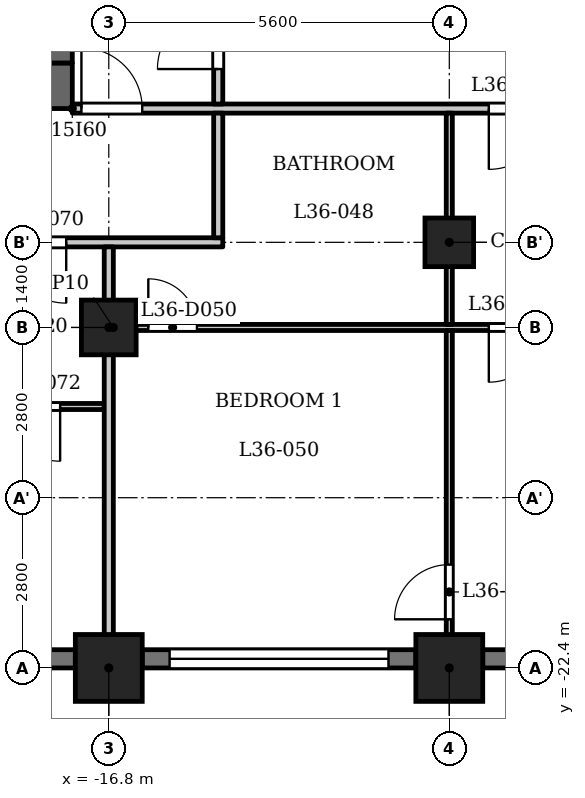
"""IFC4 building model, lengths in metres.
Left out: names, types, materials, properties, quantities, classifications, styles, units other than length and angle.
Written with IfcOpenShell. Run it as: python <this file> out.ifc"""

import sys

from ifc_helpers import new_model, si_unit, direction, frame, frame_2d, origin, origin_2d, place, context, subcontext, project, spatial, rectangle, extrude, element, fill, save


model = new_model("IFC4")
c1 = context("Model", 3, precision=1e-05, world=origin(), true_north=direction((0.0, 1.0)))
c2 = subcontext(c1, "Body", "Model", "MODEL_VIEW")
j1 = project(units=[si_unit("LENGTHUNIT", "METRE"), si_unit("PLANEANGLEUNIT", "RADIAN")], contexts=[c1])
p1 = place(None, origin())
s1 = spatial("IfcSite", under=j1, at=p1, CompositionType="ELEMENT")
p2 = place(p1, origin())
s2 = spatial("IfcBuilding", under=s1, at=p2, CompositionType="ELEMENT")
p3 = place(p2, frame((0.0, 0.0, 143.1)))
s3 = spatial("IfcBuildingStorey", under=s2, at=p3, CompositionType="ELEMENT", Elevation=143.1)
for number, where, z_axis, x_axis in (
    (1, (-16.8, -22.4, 0.0), (0.0, 0.0, 1.0), (1.0, 0.0, 0.0)),
    (2, (-11.2, -22.4, 0.0), (0.0, 0.0, 1.0), (1.0, 0.0, 0.0)),
):
    element("IfcColumn", number, at=place(p3, frame(where, z_axis=z_axis, x_axis=x_axis)), inside=s3, PredefinedType="COLUMN", context=c2, shape_type="SweptSolid", body=[
        extrude(rectangle(XDim=1.1, YDim=1.1, at=origin_2d()), origin(), (0.0, 0.0, 1.0), 3.5),
    ])
p4 = place(p3, frame((-16.8, -16.8, 0.0), z_axis=(0.0, 0.0, 1.0), x_axis=(1.0, 0.0, 0.0)))
e3 = element("IfcColumn", 3, at=p4, inside=s3, PredefinedType="COLUMN", context=c2, shape_type="SweptSolid", body=[
    extrude(rectangle(XDim=0.9, YDim=0.9, at=origin_2d()), origin(), (0.0, 0.0, 1.0), 3.5),
])
p5 = place(p3, frame((-11.2, -15.4, 0.0), z_axis=(0.0, 0.0, 1.0), x_axis=(1.0, 0.0, 0.0)))
e4 = element("IfcColumn", 4, at=p5, inside=s3, PredefinedType="COLUMN", context=c2, shape_type="SweptSolid", body=[
    extrude(rectangle(XDim=0.8, YDim=0.8, at=origin_2d()), origin(), (0.0, 0.0, 1.0), 3.5),
])
p6 = place(p3, frame((-20.0, -22.25, 0.0), z_axis=(0.0, 0.0, 1.0), x_axis=(1.0, 0.0, 0.0)))
e5 = element("IfcWall", 5, at=p6, inside=s3, PredefinedType="SOLIDWALL", context=c2, shape_type="SweptSolid", body=[
    extrude(rectangle(XDim=2.65, YDim=0.3, at=frame_2d((1.325, 0.0))), origin(), (0.0, 0.0, 1.0), 2.45),
])
p7 = place(p6, frame((0.425, 0.0, 0.9)))
e6 = element("IfcOpeningElement", 6, at=p7, cuts=e5, PredefinedType="OPENING", context=c2, shape_type="SweptSolid", body=[
    extrude(rectangle(XDim=1.8, YDim=1.25, at=frame_2d((0.9, 0.625))), frame((0.0, 0.16, 0.0), z_axis=(0.0, -1.0, 0.0), x_axis=(1.0, 0.0, 0.0)), (0.0, 0.0, 1.0), 0.32),
])
p8 = place(p3, frame((-16.25, -22.25, 0.0), z_axis=(0.0, 0.0, 1.0), x_axis=(1.0, 0.0, 0.0)))
e7 = element("IfcWall", 7, at=p8, inside=s3, PredefinedType="SOLIDWALL", context=c2, shape_type="SweptSolid", body=[
    extrude(rectangle(XDim=4.5, YDim=0.3, at=frame_2d((2.25, 0.0))), origin(), (0.0, 0.0, 1.0), 2.45),
])
p9 = place(p8, frame((0.45, 0.0, 1.2)))
e8 = element("IfcOpeningElement", 8, at=p9, cuts=e7, PredefinedType="OPENING", context=c2, shape_type="SweptSolid", body=[
    extrude(rectangle(XDim=3.6, YDim=0.95, at=frame_2d((1.8, 0.475))), frame((0.0, 0.16, 0.0), z_axis=(0.0, -1.0, 0.0), x_axis=(1.0, 0.0, 0.0)), (0.0, 0.0, 1.0), 0.32),
])
p10 = place(p3, frame((-10.65, -22.25, 0.0), z_axis=(0.0, 0.0, 1.0), x_axis=(1.0, 0.0, 0.0)))
e9 = element("IfcWall", 9, at=p10, inside=s3, PredefinedType="SOLIDWALL", context=c2, shape_type="SweptSolid", body=[
    extrude(rectangle(XDim=4.5, YDim=0.3, at=frame_2d((2.25, 0.0))), origin(), (0.0, 0.0, 1.0), 2.45),
])
p11 = place(p10, frame((0.45, 0.0, 1.2)))
e10 = element("IfcOpeningElement", 10, at=p11, cuts=e9, PredefinedType="OPENING", context=c2, shape_type="SweptSolid", body=[
    extrude(rectangle(XDim=3.6, YDim=0.95, at=frame_2d((1.8, 0.475))), frame((0.0, 0.16, 0.0), z_axis=(0.0, -1.0, 0.0), x_axis=(1.0, 0.0, 0.0)), (0.0, 0.0, 1.0), 0.32),
])
p12 = place(p3, frame((-17.4, -12.825, 0.0), z_axis=(0.0, 0.0, 1.0), x_axis=(-1.0, 0.0, 0.0)))
e11 = element("IfcWall", 11, at=p12, inside=s3, PredefinedType="SHEAR", context=c2, shape_type="SweptSolid", body=[
    extrude(rectangle(XDim=10.4, YDim=0.75, at=frame_2d((5.2, 0.0))), origin(), (0.0, 0.0, 1.0), 3.2),
])
p13 = place(p3, frame((-17.6, -12.45, 0.0), z_axis=(0.0, 0.0, 1.0), x_axis=(0.0, 1.0, 0.0)))
e12 = element("IfcWall", 12, at=p13, inside=s3, PredefinedType="SHEAR", context=c2, shape_type="SweptSolid", body=[
    extrude(rectangle(XDim=24.9, YDim=0.4, at=frame_2d((12.45, 0.0))), origin(), (0.0, 0.0, 1.0), 3.2),
])
p14 = place(p13, frame((8.65, 0.0, 0.0)))
e13 = element("IfcOpeningElement", 13, at=p14, cuts=e12, PredefinedType="OPENING", context=c2, shape_type="SweptSolid", body=[
    extrude(rectangle(XDim=0.9, YDim=2.1, at=frame_2d((0.45, 1.05))), frame((0.0, 0.21, 0.0), z_axis=(0.0, -1.0, 0.0), x_axis=(1.0, 0.0, 0.0)), (0.0, 0.0, 1.0), 0.42),
])
p15 = place(p13, frame((15.6, 0.0, 0.0)))
e14 = element("IfcOpeningElement", 14, at=p15, cuts=e12, PredefinedType="OPENING", context=c2, shape_type="SweptSolid", body=[
    extrude(rectangle(XDim=1.1, YDim=2.1, at=frame_2d((0.55, 1.05))), frame((0.0, 0.21, 0.0), z_axis=(0.0, -1.0, 0.0), x_axis=(1.0, 0.0, 0.0)), (0.0, 0.0, 1.0), 0.42),
])
p16 = place(p13, frame((18.0, 0.0, 0.0)))
e15 = element("IfcOpeningElement", 15, at=p16, cuts=e12, PredefinedType="OPENING", context=c2, shape_type="SweptSolid", body=[
    extrude(rectangle(XDim=1.1, YDim=2.1, at=frame_2d((0.55, 1.05))), frame((0.0, 0.21, 0.0), z_axis=(0.0, -1.0, 0.0), x_axis=(1.0, 0.0, 0.0)), (0.0, 0.0, 1.0), 0.42),
])
p17 = place(p13, frame((23.025, 0.0, 0.0)))
e16 = element("IfcOpeningElement", 16, at=p17, cuts=e12, PredefinedType="OPENING", context=c2, shape_type="SweptSolid", body=[
    extrude(rectangle(XDim=1.1, YDim=2.1, at=frame_2d((0.55, 1.05))), frame((0.0, 0.21, 0.0), z_axis=(0.0, -1.0, 0.0), x_axis=(1.0, 0.0, 0.0)), (0.0, 0.0, 1.0), 0.42),
])
p18 = place(p13, frame((0.775, 0.0, 0.0)))
e17 = element("IfcOpeningElement", 17, at=p18, cuts=e12, PredefinedType="OPENING", context=c2, shape_type="SweptSolid", body=[
    extrude(rectangle(XDim=1.1, YDim=2.1, at=frame_2d((0.55, 1.05))), frame((0.0, 0.21, 0.0), z_axis=(0.0, -1.0, 0.0), x_axis=(1.0, 0.0, 0.0)), (0.0, 0.0, 1.0), 0.42),
])
p19 = place(p13, frame((12.925, 0.0, 0.0)))
e18 = element("IfcOpeningElement", 18, at=p19, cuts=e12, PredefinedType="OPENING", context=c2, shape_type="SweptSolid", body=[
    extrude(rectangle(XDim=1.8, YDim=2.1, at=frame_2d((0.9, 1.05))), frame((0.0, 0.21, 0.0), z_axis=(0.0, -1.0, 0.0), x_axis=(1.0, 0.0, 0.0)), (0.0, 0.0, 1.0), 0.42),
])
p20 = place(p3, frame((-26.19, -18.1, 0.0), z_axis=(0.0, 0.0, 1.0), x_axis=(1.0, 0.0, 0.0)))
e19 = element("IfcWall", 19, at=p20, inside=s3, PredefinedType="PARTITIONING", context=c2, shape_type="SweptSolid", body=[
    extrude(rectangle(XDim=9.315, YDim=0.1, at=frame_2d((4.658, 0.0))), origin(), (0.0, 0.0, 1.0), 3.2),
])
p21 = place(p20, frame((2.34, 0.0, 0.0)))
e20 = element("IfcOpeningElement", 20, at=p21, cuts=e19, PredefinedType="OPENING", context=c2, shape_type="SweptSolid", body=[
    extrude(rectangle(XDim=0.8, YDim=2.1, at=frame_2d((0.4, 1.05))), frame((0.0, 0.06, 0.0), z_axis=(0.0, -1.0, 0.0), x_axis=(1.0, 0.0, 0.0)), (0.0, 0.0, 1.0), 0.12),
])
p22 = place(p20, frame((7.69, 0.0, 0.0)))
e21 = element("IfcOpeningElement", 21, at=p22, cuts=e19, PredefinedType="OPENING", context=c2, shape_type="SweptSolid", body=[
    extrude(rectangle(XDim=0.9, YDim=2.1, at=frame_2d((0.45, 1.05))), frame((0.0, 0.06, 0.0), z_axis=(0.0, -1.0, 0.0), x_axis=(1.0, 0.0, 0.0)), (0.0, 0.0, 1.0), 0.12),
])
p23 = place(p3, frame((-16.725, -16.8, 0.0), z_axis=(0.0, 0.0, 1.0), x_axis=(1.0, 0.0, 0.0)))
e22 = element("IfcWall", 22, at=p23, inside=s3, PredefinedType="PARTITIONING", context=c2, shape_type="SweptSolid", body=[
    extrude(rectangle(XDim=33.45, YDim=0.1, at=frame_2d((16.725, 0.0))), origin(), (0.0, 0.0, 1.0), 3.2),
])
p24 = place(p23, frame((0.575, 0.0, 0.0)))
e23 = element("IfcOpeningElement", 23, at=p24, cuts=e22, PredefinedType="OPENING", context=c2, shape_type="SweptSolid", body=[
    extrude(rectangle(XDim=0.8, YDim=2.1, at=frame_2d((0.4, 1.05))), frame((0.0, 0.06, 0.0), z_axis=(0.0, -1.0, 0.0), x_axis=(1.0, 0.0, 0.0)), (0.0, 0.0, 1.0), 0.12),
])
p25 = place(p23, frame((6.175, 0.0, 0.0)))
e24 = element("IfcOpeningElement", 24, at=p25, cuts=e22, PredefinedType="OPENING", context=c2, shape_type="SweptSolid", body=[
    extrude(rectangle(XDim=0.9, YDim=2.1, at=frame_2d((0.45, 1.05))), frame((0.0, 0.06, 0.0), z_axis=(0.0, -1.0, 0.0), x_axis=(1.0, 0.0, 0.0)), (0.0, 0.0, 1.0), 0.12),
])
p26 = place(p23, frame((15.275, 0.0, 0.0)))
e25 = element("IfcOpeningElement", 25, at=p26, cuts=e22, PredefinedType="OPENING", context=c2, shape_type="SweptSolid", body=[
    extrude(rectangle(XDim=0.8, YDim=2.1, at=frame_2d((0.4, 1.05))), frame((0.0, 0.06, 0.0), z_axis=(0.0, -1.0, 0.0), x_axis=(1.0, 0.0, 0.0)), (0.0, 0.0, 1.0), 0.12),
])
p27 = place(p23, frame((11.775, 0.0, 0.0)))
e26 = element("IfcOpeningElement", 26, at=p27, cuts=e22, PredefinedType="OPENING", context=c2, shape_type="SweptSolid", body=[
    extrude(rectangle(XDim=0.9, YDim=2.1, at=frame_2d((0.45, 1.05))), frame((0.0, 0.06, 0.0), z_axis=(0.0, -1.0, 0.0), x_axis=(1.0, 0.0, 0.0)), (0.0, 0.0, 1.0), 0.12),
])
p28 = place(p23, frame((17.275, 0.0, 0.0)))
e27 = element("IfcOpeningElement", 27, at=p28, cuts=e22, PredefinedType="OPENING", context=c2, shape_type="SweptSolid", body=[
    extrude(rectangle(XDim=0.8, YDim=2.1, at=frame_2d((0.4, 1.05))), frame((0.0, 0.06, 0.0), z_axis=(0.0, -1.0, 0.0), x_axis=(1.0, 0.0, 0.0)), (0.0, 0.0, 1.0), 0.12),
])
p29 = place(p23, frame((20.775, 0.0, 0.0)))
e28 = element("IfcOpeningElement", 28, at=p29, cuts=e22, PredefinedType="OPENING", context=c2, shape_type="SweptSolid", body=[
    extrude(rectangle(XDim=0.9, YDim=2.1, at=frame_2d((0.45, 1.05))), frame((0.0, 0.06, 0.0), z_axis=(0.0, -1.0, 0.0), x_axis=(1.0, 0.0, 0.0)), (0.0, 0.0, 1.0), 0.12),
])
p30 = place(p23, frame((31.575, 0.0, 0.0)))
e29 = element("IfcOpeningElement", 29, at=p30, cuts=e22, PredefinedType="OPENING", context=c2, shape_type="SweptSolid", body=[
    extrude(rectangle(XDim=0.8, YDim=2.1, at=frame_2d((0.4, 1.05))), frame((0.0, 0.06, 0.0), z_axis=(0.0, -1.0, 0.0), x_axis=(1.0, 0.0, 0.0)), (0.0, 0.0, 1.0), 0.12),
])
p31 = place(p23, frame((28.575, 0.0, 0.0)))
e30 = element("IfcOpeningElement", 30, at=p31, cuts=e22, PredefinedType="OPENING", context=c2, shape_type="SweptSolid", body=[
    extrude(rectangle(XDim=0.9, YDim=2.1, at=frame_2d((0.45, 1.05))), frame((0.0, 0.06, 0.0), z_axis=(0.0, -1.0, 0.0), x_axis=(1.0, 0.0, 0.0)), (0.0, 0.0, 1.0), 0.12),
])
p32 = place(p23, frame((23.725, 0.0, 0.0)))
e31 = element("IfcOpeningElement", 31, at=p32, cuts=e22, PredefinedType="OPENING", context=c2, shape_type="SweptSolid", body=[
    extrude(rectangle(XDim=0.9, YDim=2.1, at=frame_2d((0.45, 1.05))), frame((0.0, 0.06, 0.0), z_axis=(0.0, -1.0, 0.0), x_axis=(1.0, 0.0, 0.0)), (0.0, 0.0, 1.0), 0.12),
])
p33 = place(p23, frame((26.225, 0.0, 0.0)))
e32 = element("IfcOpeningElement", 32, at=p33, cuts=e22, PredefinedType="OPENING", context=c2, shape_type="SweptSolid", body=[
    extrude(rectangle(XDim=0.9, YDim=2.1, at=frame_2d((0.45, 1.05))), frame((0.0, 0.06, 0.0), z_axis=(0.0, -1.0, 0.0), x_axis=(1.0, 0.0, 0.0)), (0.0, 0.0, 1.0), 0.12),
])
p34 = place(p3, frame((-27.484, -15.4, 0.0), z_axis=(0.0, 0.0, 1.0), x_axis=(1.0, 0.0, 0.0)))
e33 = element("IfcWall", 33, at=p34, inside=s3, PredefinedType="PARTITIONING", context=c2, shape_type="SweptSolid", body=[
    extrude(rectangle(XDim=12.559, YDim=0.15, at=frame_2d((6.279, 0.0))), origin(), (0.0, 0.0, 1.0), 3.2),
])
p35 = place(p34, frame((8.984, 0.0, 0.0)))
e34 = element("IfcOpeningElement", 34, at=p35, cuts=e33, PredefinedType="OPENING", context=c2, shape_type="SweptSolid", body=[
    extrude(rectangle(XDim=1.0, YDim=2.1, at=frame_2d((0.5, 1.05))), frame((0.0, 0.085, 0.0), z_axis=(0.0, -1.0, 0.0), x_axis=(1.0, 0.0, 0.0)), (0.0, 0.0, 1.0), 0.17),
])
p36 = place(p3, frame((-17.4, -13.2, 0.0), z_axis=(0.0, 0.0, 1.0), x_axis=(1.0, 0.0, 0.0)))
e35 = element("IfcWall", 35, at=p36, inside=s3, PredefinedType="PARTITIONING", context=c2, shape_type="SweptSolid", body=[
    extrude(rectangle(XDim=34.8, YDim=0.15, at=frame_2d((17.4, 0.0))), origin(), (0.0, 0.0, 1.0), 3.2),
])
p37 = place(p36, frame((0.15, 0.0, 0.0)))
e36 = element("IfcOpeningElement", 36, at=p37, cuts=e35, PredefinedType="OPENING", context=c2, shape_type="SweptSolid", body=[
    extrude(rectangle(XDim=1.0, YDim=2.1, at=frame_2d((0.5, 1.05))), frame((0.0, 0.085, 0.0), z_axis=(0.0, -1.0, 0.0), x_axis=(1.0, 0.0, 0.0)), (0.0, 0.0, 1.0), 0.17),
])
p38 = place(p36, frame((33.55, 0.0, 0.0)))
e37 = element("IfcOpeningElement", 37, at=p38, cuts=e35, PredefinedType="OPENING", context=c2, shape_type="SweptSolid", body=[
    extrude(rectangle(XDim=1.0, YDim=2.1, at=frame_2d((0.5, 1.05))), frame((0.0, 0.085, 0.0), z_axis=(0.0, -1.0, 0.0), x_axis=(1.0, 0.0, 0.0)), (0.0, 0.0, 1.0), 0.17),
])
p39 = place(p36, frame((6.85, 0.0, 0.0)))
e38 = element("IfcOpeningElement", 38, at=p39, cuts=e35, PredefinedType="OPENING", context=c2, shape_type="SweptSolid", body=[
    extrude(rectangle(XDim=1.0, YDim=2.1, at=frame_2d((0.5, 1.05))), frame((0.0, 0.085, 0.0), z_axis=(0.0, -1.0, 0.0), x_axis=(1.0, 0.0, 0.0)), (0.0, 0.0, 1.0), 0.17),
])
p40 = place(p36, frame((12.45, 0.0, 0.0)))
e39 = element("IfcOpeningElement", 39, at=p40, cuts=e35, PredefinedType="OPENING", context=c2, shape_type="SweptSolid", body=[
    extrude(rectangle(XDim=1.0, YDim=2.1, at=frame_2d((0.5, 1.05))), frame((0.0, 0.085, 0.0), z_axis=(0.0, -1.0, 0.0), x_axis=(1.0, 0.0, 0.0)), (0.0, 0.0, 1.0), 0.17),
])
p41 = place(p36, frame((21.3, 0.0, 0.0)))
e40 = element("IfcOpeningElement", 40, at=p41, cuts=e35, PredefinedType="OPENING", context=c2, shape_type="SweptSolid", body=[
    extrude(rectangle(XDim=1.0, YDim=2.1, at=frame_2d((0.5, 1.05))), frame((0.0, 0.085, 0.0), z_axis=(0.0, -1.0, 0.0), x_axis=(1.0, 0.0, 0.0)), (0.0, 0.0, 1.0), 0.17),
])
p42 = place(p36, frame((26.9, 0.0, 0.0)))
e41 = element("IfcOpeningElement", 41, at=p42, cuts=e35, PredefinedType="OPENING", context=c2, shape_type="SweptSolid", body=[
    extrude(rectangle(XDim=1.0, YDim=2.1, at=frame_2d((0.5, 1.05))), frame((0.0, 0.085, 0.0), z_axis=(0.0, -1.0, 0.0), x_axis=(1.0, 0.0, 0.0)), (0.0, 0.0, 1.0), 0.17),
])
p43 = place(p3, frame((-16.8, -22.93, 0.0), z_axis=(0.0, 0.0, 1.0), x_axis=(0.0, 1.0, 0.0)))
e42 = element("IfcWall", 42, at=p43, inside=s3, PredefinedType="PARTITIONING", context=c2, shape_type="SweptSolid", body=[
    extrude(rectangle(XDim=7.455, YDim=0.15, at=frame_2d((3.728, 0.0))), origin(), (0.0, 0.0, 1.0), 3.2),
])
p44 = place(p3, frame((-15.0, -15.325, 0.0), z_axis=(0.0, 0.0, 1.0), x_axis=(0.0, 1.0, 0.0)))
e43 = element("IfcWall", 43, at=p44, inside=s3, PredefinedType="PARTITIONING", context=c2, shape_type="SweptSolid", body=[
    extrude(rectangle(XDim=2.05, YDim=0.15, at=frame_2d((1.025, 0.0))), origin(), (0.0, 0.0, 1.0), 3.2),
])
p45 = place(p3, frame((-15.0, -13.125, 0.0), z_axis=(0.0, 0.0, 1.0), x_axis=(0.0, 1.0, 0.0)))
e44 = element("IfcWall", 44, at=p45, inside=s3, PredefinedType="PARTITIONING", context=c2, shape_type="SweptSolid", body=[
    extrude(rectangle(XDim=6.356, YDim=0.15, at=frame_2d((3.178, 0.0))), origin(), (0.0, 0.0, 1.0), 3.2),
])
p46 = place(p45, frame((0.575, 0.0, 0.0)))
e45 = element("IfcOpeningElement", 45, at=p46, cuts=e44, PredefinedType="OPENING", context=c2, shape_type="SweptSolid", body=[
    extrude(rectangle(XDim=1.0, YDim=2.1, at=frame_2d((0.5, 1.05))), frame((0.0, 0.085, 0.0), z_axis=(0.0, -1.0, 0.0), x_axis=(1.0, 0.0, 0.0)), (0.0, 0.0, 1.0), 0.17),
])
p47 = place(p3, frame((-11.2, -22.93, 0.0), z_axis=(0.0, 0.0, 1.0), x_axis=(0.0, 1.0, 0.0)))
e46 = element("IfcWall", 46, at=p47, inside=s3, PredefinedType="PARTITIONING", context=c2, shape_type="SweptSolid", body=[
    extrude(rectangle(XDim=6.08, YDim=0.1, at=frame_2d((3.04, 0.0))), origin(), (0.0, 0.0, 1.0), 3.2),
])
p48 = place(p47, frame((1.33, 0.0, 0.0)))
e47 = element("IfcOpeningElement", 47, at=p48, cuts=e46, PredefinedType="OPENING", context=c2, shape_type="SweptSolid", body=[
    extrude(rectangle(XDim=0.9, YDim=2.1, at=frame_2d((0.45, 1.05))), frame((0.0, 0.06, 0.0), z_axis=(0.0, -1.0, 0.0), x_axis=(1.0, 0.0, 0.0)), (0.0, 0.0, 1.0), 0.12),
])
p49 = place(p3, frame((-11.2, -16.75, 0.0), z_axis=(0.0, 0.0, 1.0), x_axis=(0.0, 1.0, 0.0)))
e48 = element("IfcWall", 48, at=p49, inside=s3, PredefinedType="PARTITIONING", context=c2, shape_type="SweptSolid", body=[
    extrude(rectangle(XDim=3.475, YDim=0.1, at=frame_2d((1.738, 0.0))), origin(), (0.0, 0.0, 1.0), 3.2),
])
p50 = place(p46, origin())
e49 = element("IfcDoor", 49, at=p50, inside=s3, OperationType="SINGLE_SWING_RIGHT", PredefinedType="DOOR", context=c2, shape_type="SweptSolid", body=[
    extrude(rectangle(XDim=1.0, YDim=2.1, at=frame_2d((0.5, 1.05))), frame((0.0, 0.025, 0.0), z_axis=(0.0, -1.0, 0.0), x_axis=(1.0, 0.0, 0.0)), (0.0, 0.0, 1.0), 0.05),
])
fill(e45, e49)
p51 = place(p37, origin())
e50 = element("IfcDoor", 50, at=p51, inside=s3, OperationType="SINGLE_SWING_RIGHT", PredefinedType="DOOR", context=c2, shape_type="SweptSolid", body=[
    extrude(rectangle(XDim=1.0, YDim=2.1, at=frame_2d((0.5, 1.05))), frame((0.0, 0.025, 0.0), z_axis=(0.0, -1.0, 0.0), x_axis=(1.0, 0.0, 0.0)), (0.0, 0.0, 1.0), 0.05),
])
fill(e36, e50)
p52 = place(p39, origin())
e51 = element("IfcDoor", 51, at=p52, inside=s3, OperationType="SINGLE_SWING_LEFT", PredefinedType="DOOR", context=c2, shape_type="SweptSolid", body=[
    extrude(rectangle(XDim=1.0, YDim=2.1, at=frame_2d((0.5, 1.05))), frame((0.0, 0.025, 0.0), z_axis=(0.0, -1.0, 0.0), x_axis=(1.0, 0.0, 0.0)), (0.0, 0.0, 1.0), 0.05),
])
fill(e38, e51)
p53 = place(p24, origin())
e52 = element("IfcDoor", 52, at=p53, inside=s3, OperationType="SINGLE_SWING_RIGHT", PredefinedType="DOOR", context=c2, shape_type="SweptSolid", body=[
    extrude(rectangle(XDim=0.8, YDim=2.1, at=frame_2d((0.4, 1.05))), frame((0.0, 0.025, 0.0), z_axis=(0.0, -1.0, 0.0), x_axis=(1.0, 0.0, 0.0)), (0.0, 0.0, 1.0), 0.05),
])
fill(e23, e52)
p54 = place(p25, origin())
e53 = element("IfcDoor", 53, at=p54, inside=s3, OperationType="SINGLE_SWING_LEFT", PredefinedType="DOOR", context=c2, shape_type="SweptSolid", body=[
    extrude(rectangle(XDim=0.9, YDim=2.1, at=frame_2d((0.45, 1.05))), frame((0.0, 0.025, 0.0), z_axis=(0.0, -1.0, 0.0), x_axis=(1.0, 0.0, 0.0)), (0.0, 0.0, 1.0), 0.05),
])
fill(e24, e53)
p55 = place(p48, origin())
e54 = element("IfcDoor", 54, at=p55, inside=s3, OperationType="SINGLE_SWING_RIGHT", PredefinedType="DOOR", context=c2, shape_type="SweptSolid", body=[
    extrude(rectangle(XDim=0.9, YDim=2.1, at=frame_2d((0.45, 1.05))), frame((0.0, 0.025, 0.0), z_axis=(0.0, -1.0, 0.0), x_axis=(1.0, 0.0, 0.0)), (0.0, 0.0, 1.0), 0.05),
])
fill(e47, e54)
p56 = place(p35, origin())
e55 = element("IfcDoor", 55, at=p56, inside=s3, OperationType="SINGLE_SWING_RIGHT", PredefinedType="DOOR", context=c2, shape_type="SweptSolid", body=[
    extrude(rectangle(XDim=1.0, YDim=2.1, at=frame_2d((0.5, 1.05))), frame((0.0, 0.025, 0.0), z_axis=(0.0, -1.0, 0.0), x_axis=(1.0, 0.0, 0.0)), (0.0, 0.0, 1.0), 0.05),
])
fill(e34, e55)
p57 = place(p22, origin())
e56 = element("IfcDoor", 56, at=p57, inside=s3, OperationType="SINGLE_SWING_RIGHT", PredefinedType="DOOR", context=c2, shape_type="SweptSolid", body=[
    extrude(rectangle(XDim=0.9, YDim=2.1, at=frame_2d((0.45, 1.05))), frame((0.0, 0.025, 0.0), z_axis=(0.0, -1.0, 0.0), x_axis=(1.0, 0.0, 0.0)), (0.0, 0.0, 1.0), 0.05),
])
fill(e21, e56)
p58 = place(p9, origin())
e57 = element("IfcWindow", 57, at=p58, inside=s3, PartitioningType="SINGLE_PANEL", PredefinedType="WINDOW", context=c2, shape_type="SweptSolid", body=[
    extrude(rectangle(XDim=3.6, YDim=0.95, at=frame_2d((1.8, 0.475))), frame((0.0, 0.03, 0.0), z_axis=(0.0, -1.0, 0.0), x_axis=(1.0, 0.0, 0.0)), (0.0, 0.0, 1.0), 0.06),
])
fill(e8, e57)
save(model, sys.argv[1])
